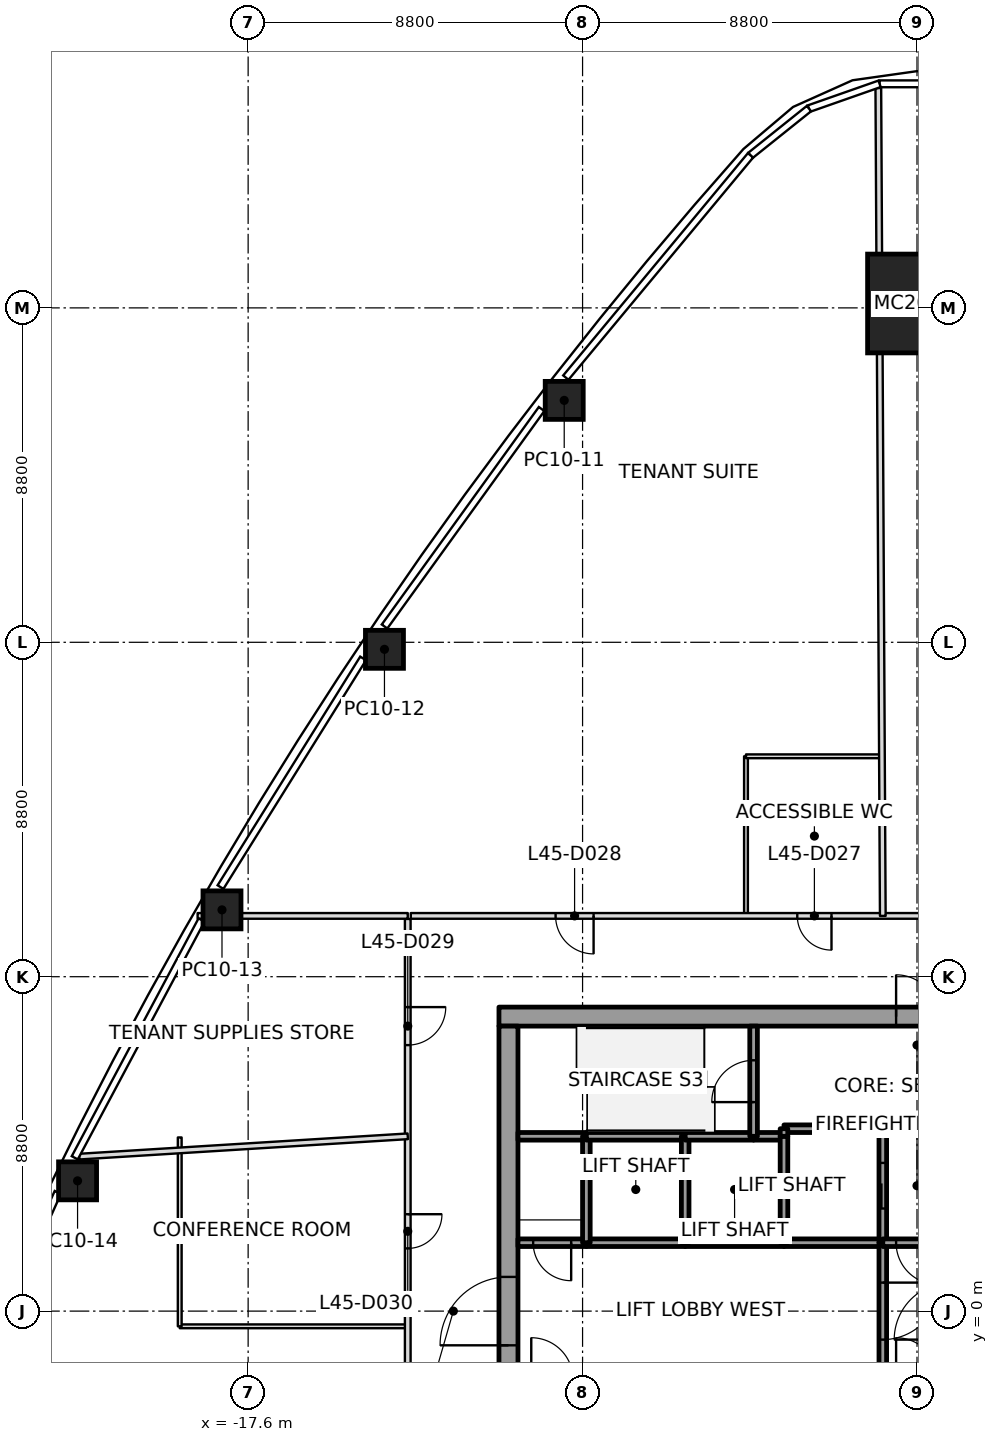
"""IFC4 building model, lengths in metres.
Left out: names, types, materials, properties, quantities, classifications, styles, units other than length and angle.
Written with IfcOpenShell. Run it as: python <this file> out.ifc"""

import sys

from ifc_helpers import new_model, si_unit, direction, frame, frame_2d, origin, origin_2d, place, context, subcontext, project, spatial, rectangle, extrude, element, fill, save


model = new_model("IFC4")
c1 = context("Model", 3, precision=1e-05, world=origin(), true_north=direction((0.0, 1.0)))
c2 = subcontext(c1, "Body", "Model", "MODEL_VIEW")
j1 = project(units=[si_unit("LENGTHUNIT", "METRE"), si_unit("PLANEANGLEUNIT", "RADIAN")], contexts=[c1])
p1 = place(None, origin())
s1 = spatial("IfcSite", under=j1, at=p1, CompositionType="ELEMENT")
p2 = place(p1, origin())
s2 = spatial("IfcBuilding", under=s1, at=p2, CompositionType="ELEMENT")
p3 = place(p2, frame((0.0, 0.0, 201.8)))
s3 = spatial("IfcBuildingStorey", under=s2, at=p3, CompositionType="ELEMENT", Elevation=201.8)
p4 = place(p3, frame((0.0, 26.515, 0.0), z_axis=(0.0, -0.032270781071, 0.999479162709), x_axis=(1.0, 0.0, 0.0)))
e1 = element("IfcColumn", 1, at=p4, inside=s3, PredefinedType="COLUMN", context=c2, shape_type="SweptSolid", body=[
    extrude(rectangle(XDim=2.6, YDim=2.6, at=origin_2d()), origin(), (0.0, 0.0, 1.0), 4.002),
])
p5 = place(p3, frame((-9.283, 23.966, 0.0), z_axis=(0.0002440896, -0.020442503975, 0.999791000385), x_axis=(0.612560827359, 0.79026131933, 0.016008746256)))
e2 = element("IfcColumn", 2, at=p5, inside=s3, PredefinedType="COLUMN", context=c2, shape_type="SweptSolid", body=[
    extrude(rectangle(XDim=1.0, YDim=1.0, at=origin_2d()), origin(), (0.0, 0.0, 1.0), 4.001),
])
p6 = place(p3, frame((-14.013, 17.415, 0.0), z_axis=(0.005309522349, -0.013182262383, 0.999899013366), x_axis=(0.557556155911, 0.830100839547, 0.007983056383)))
e3 = element("IfcColumn", 3, at=p6, inside=s3, PredefinedType="COLUMN", context=c2, shape_type="SweptSolid", body=[
    extrude(rectangle(XDim=1.0, YDim=1.0, at=origin_2d()), origin(), (0.0, 0.0, 1.0), 4.0),
])
p7 = place(p3, frame((-18.288, 10.559, 0.0), z_axis=(0.009948074445, -0.005736926367, 0.999934059571), x_axis=(0.499975258342, 0.8660396879, -5.385525e-06)))
e4 = element("IfcColumn", 4, at=p7, inside=s3, PredefinedType="COLUMN", context=c2, shape_type="SweptSolid", body=[
    extrude(rectangle(XDim=1.0, YDim=1.0, at=origin_2d()), origin(), (0.0, 0.0, 1.0), 4.0),
])
p8 = place(p3, frame((-22.088, 3.428, 0.0), z_axis=(0.014097689605, 0.002074984617, 0.999898469639), x_axis=(0.440091339145, 0.89791676479, -0.008068253744)))
e5 = element("IfcColumn", 5, at=p8, inside=s3, PredefinedType="COLUMN", context=c2, shape_type="SweptSolid", body=[
    extrude(rectangle(XDim=1.0, YDim=1.0, at=origin_2d()), origin(), (0.0, 0.0, 1.0), 4.0),
])
p9 = place(p3, frame((-11.0, 7.75, 0.0), z_axis=(0.0, 0.0, 1.0), x_axis=(1.0, 0.0, 0.0)))
e6 = element("IfcWall", 6, at=p9, inside=s3, PredefinedType="SHEAR", context=c2, shape_type="SweptSolid", body=[
    extrude(rectangle(XDim=22.0, YDim=0.5, at=frame_2d((11.0, 0.0))), origin(), (0.0, 0.0, 1.0), 4.0),
])
p10 = place(p9, frame((10.45, 0.0, 0.0)))
e7 = element("IfcOpeningElement", 7, at=p10, cuts=e6, PredefinedType="OPENING", context=c2, shape_type="SweptSolid", body=[
    extrude(rectangle(XDim=1.1, YDim=2.1, at=frame_2d((0.55, 1.05))), frame((0.0, 0.25, 0.0), z_axis=(0.0, -1.0, 0.0), x_axis=(1.0, 0.0, 0.0)), (0.0, 0.0, 1.0), 0.5),
])
p11 = place(p3, frame((-10.75, -7.5, 0.0), z_axis=(0.0, 0.0, 1.0), x_axis=(0.0, 1.0, 0.0)))
e8 = element("IfcWall", 8, at=p11, inside=s3, PredefinedType="SHEAR", context=c2, shape_type="SweptSolid", body=[
    extrude(rectangle(XDim=15.0, YDim=0.5, at=frame_2d((7.5, 0.0))), origin(), (0.0, 0.0, 1.0), 4.0),
])
p12 = place(p11, frame((6.6, 0.0, 0.0)))
e9 = element("IfcOpeningElement", 9, at=p12, cuts=e8, PredefinedType="OPENING", context=c2, shape_type="SweptSolid", body=[
    extrude(rectangle(XDim=1.8, YDim=2.1, at=frame_2d((0.9, 1.05))), frame((0.0, 0.25, 0.0), z_axis=(0.0, -1.0, 0.0), x_axis=(1.0, 0.0, 0.0)), (0.0, 0.0, 1.0), 0.5),
])
p13 = place(p3, frame((-8.7, 1.8, 0.0), z_axis=(0.0, 0.0, 1.0), x_axis=(-1.0, 0.0, 0.0)))
e10 = element("IfcWall", 10, at=p13, inside=s3, PredefinedType="SOLIDWALL", context=c2, shape_type="SweptSolid", body=[
    extrude(rectangle(XDim=1.8, YDim=0.2, at=frame_2d((0.9, 0.0))), origin(), (0.0, 0.0, 1.0), 3.85),
])
p14 = place(p13, frame((0.4, 0.0, 0.0)))
e11 = element("IfcOpeningElement", 11, at=p14, cuts=e10, PredefinedType="OPENING", context=c2, shape_type="SweptSolid", body=[
    extrude(rectangle(XDim=1.0, YDim=2.1, at=frame_2d((0.5, 1.05))), frame((0.0, 0.1, 0.0), z_axis=(0.0, -1.0, 0.0), x_axis=(1.0, 0.0, 0.0)), (0.0, 0.0, 1.0), 0.2),
])
p15 = place(p3, frame((-8.7, 4.6, 0.0), z_axis=(0.0, 0.0, 1.0), x_axis=(-1.0, 0.0, 0.0)))
e12 = element("IfcWall", 12, at=p15, inside=s3, PredefinedType="SOLIDWALL", context=c2, shape_type="SweptSolid", body=[
    extrude(rectangle(XDim=1.8, YDim=0.2, at=frame_2d((0.9, 0.0))), origin(), (0.0, 0.0, 1.0), 3.85),
])
p16 = place(p3, frame((-6.1, 1.8, 0.0), z_axis=(0.0, 0.0, 1.0), x_axis=(-1.0, 0.0, 0.0)))
e13 = element("IfcWall", 13, at=p16, inside=s3, PredefinedType="SOLIDWALL", context=c2, shape_type="SweptSolid", body=[
    extrude(rectangle(XDim=2.6, YDim=0.2, at=frame_2d((1.3, 0.0))), origin(), (0.0, 0.0, 1.0), 3.85),
])
p17 = place(p3, frame((-8.7, 1.8, 0.0), z_axis=(0.0, 0.0, 1.0), x_axis=(0.0, 1.0, 0.0)))
e14 = element("IfcWall", 14, at=p17, inside=s3, PredefinedType="SOLIDWALL", context=c2, shape_type="SweptSolid", body=[
    extrude(rectangle(XDim=2.8, YDim=0.2, at=frame_2d((1.4, 0.0))), origin(), (0.0, 0.0, 1.0), 3.85),
])
p18 = place(p3, frame((-6.1, 4.6, 0.0), z_axis=(0.0, 0.0, 1.0), x_axis=(-1.0, 0.0, 0.0)))
e15 = element("IfcWall", 15, at=p18, inside=s3, PredefinedType="SOLIDWALL", context=c2, shape_type="SweptSolid", body=[
    extrude(rectangle(XDim=2.6, YDim=0.2, at=frame_2d((1.3, 0.0))), origin(), (0.0, 0.0, 1.0), 3.85),
])
p19 = place(p3, frame((-3.5, 1.8, 0.0), z_axis=(0.0, 0.0, 1.0), x_axis=(-1.0, 0.0, 0.0)))
e16 = element("IfcWall", 16, at=p19, inside=s3, PredefinedType="SOLIDWALL", context=c2, shape_type="SweptSolid", body=[
    extrude(rectangle(XDim=2.6, YDim=0.2, at=frame_2d((1.3, 0.0))), origin(), (0.0, 0.0, 1.0), 3.85),
])
p20 = place(p3, frame((-6.1, 1.8, 0.0), z_axis=(0.0, 0.0, 1.0), x_axis=(0.0, 1.0, 0.0)))
e17 = element("IfcWall", 17, at=p20, inside=s3, PredefinedType="SOLIDWALL", context=c2, shape_type="SweptSolid", body=[
    extrude(rectangle(XDim=2.8, YDim=0.2, at=frame_2d((1.4, 0.0))), origin(), (0.0, 0.0, 1.0), 3.85),
])
p21 = place(p3, frame((-4.3, 4.6, 0.0), z_axis=(0.0, 0.0, 1.0), x_axis=(-1.0, 0.0, 0.0)))
e18 = element("IfcWall", 18, at=p21, inside=s3, PredefinedType="SOLIDWALL", context=c2, shape_type="SweptSolid", body=[
    extrude(rectangle(XDim=1.8, YDim=0.2, at=frame_2d((0.9, 0.0))), origin(), (0.0, 0.0, 1.0), 3.85),
])
p22 = place(p3, frame((-3.5, 4.6, 0.0), z_axis=(0.0, 0.0, 1.0), x_axis=(-1.0, 0.0, 0.0)))
e19 = element("IfcWall", 19, at=p22, inside=s3, PredefinedType="SOLIDWALL", context=c2, shape_type="SweptSolid", body=[
    extrude(rectangle(XDim=0.8, YDim=0.2, at=frame_2d((0.4, 0.0))), origin(), (0.0, 0.0, 1.0), 3.85),
])
p23 = place(p3, frame((-4.3, 4.6, 0.0), z_axis=(0.0, 0.0, 1.0), x_axis=(0.0, 1.0, 0.0)))
e20 = element("IfcWall", 20, at=p23, inside=s3, PredefinedType="SOLIDWALL", context=c2, shape_type="SweptSolid", body=[
    extrude(rectangle(XDim=2.9, YDim=0.2, at=frame_2d((1.45, 0.0))), origin(), (0.0, 0.0, 1.0), 3.85),
])
p24 = place(p23, frame((0.9, 0.0, 0.0)))
e21 = element("IfcOpeningElement", 21, at=p24, cuts=e20, PredefinedType="OPENING", context=c2, shape_type="SweptSolid", body=[
    extrude(rectangle(XDim=1.1, YDim=2.1, at=frame_2d((0.55, 1.05))), frame((0.0, 0.1, 0.0), z_axis=(0.0, -1.0, 0.0), x_axis=(1.0, 0.0, 0.0)), (0.0, 0.0, 1.0), 0.2),
])
p25 = place(p3, frame((-0.9, 1.8, 0.0), z_axis=(0.0, 0.0, 1.0), x_axis=(-1.0, 0.0, 0.0)))
e22 = element("IfcWall", 22, at=p25, inside=s3, PredefinedType="SOLIDWALL", context=c2, shape_type="SweptSolid", body=[
    extrude(rectangle(XDim=2.6, YDim=0.2, at=frame_2d((1.3, 0.0))), origin(), (0.0, 0.0, 1.0), 3.85),
])
p26 = place(p3, frame((-3.5, 4.6, 0.0), z_axis=(0.0, 0.0, 1.0), x_axis=(0.0, -1.0, 0.0)))
e23 = element("IfcWall", 23, at=p26, inside=s3, PredefinedType="SOLIDWALL", context=c2, shape_type="SweptSolid", body=[
    extrude(rectangle(XDim=2.8, YDim=0.2, at=frame_2d((1.4, 0.0))), origin(), (0.0, 0.0, 1.0), 3.85),
])
p27 = place(p3, frame((-0.9, 1.8, 0.0), z_axis=(0.0, 0.0, 1.0), x_axis=(0.0, 1.0, 0.0)))
e24 = element("IfcWall", 24, at=p27, inside=s3, PredefinedType="SOLIDWALL", context=c2, shape_type="SweptSolid", body=[
    extrude(rectangle(XDim=3.0, YDim=0.2, at=frame_2d((1.5, 0.0))), origin(), (0.0, 0.0, 1.0), 3.85),
])
p28 = place(p27, frame((0.9, 0.0, 0.0)))
e25 = element("IfcOpeningElement", 25, at=p28, cuts=e24, PredefinedType="OPENING", context=c2, shape_type="SweptSolid", body=[
    extrude(rectangle(XDim=1.2, YDim=2.1, at=frame_2d((0.6, 1.05))), frame((0.0, 0.1, 0.0), z_axis=(0.0, -1.0, 0.0), x_axis=(1.0, 0.0, 0.0)), (0.0, 0.0, 1.0), 0.2),
])
p29 = place(p3, frame((-0.9, 4.8, 0.0), z_axis=(0.0, 0.0, 1.0), x_axis=(-1.0, 0.0, 0.0)))
e26 = element("IfcWall", 26, at=p29, inside=s3, PredefinedType="SOLIDWALL", context=c2, shape_type="SweptSolid", body=[
    extrude(rectangle(XDim=2.6, YDim=0.2, at=frame_2d((1.3, 0.0))), origin(), (0.0, 0.0, 1.0), 3.85),
])
p30 = place(p3, frame((-3.5, 4.8, 0.0), z_axis=(0.0, 0.0, 1.0), x_axis=(0.0, -1.0, 0.0)))
e27 = element("IfcWall", 27, at=p30, inside=s3, PredefinedType="SOLIDWALL", context=c2, shape_type="SweptSolid", body=[
    extrude(rectangle(XDim=0.2, YDim=0.2, at=frame_2d((0.1, 0.0))), origin(), (0.0, 0.0, 1.0), 3.85),
])
p31 = place(p3, frame((-0.9, 1.8, 0.0), z_axis=(0.0, 0.0, 1.0), x_axis=(0.0, -1.0, 0.0)))
e28 = element("IfcWall", 28, at=p31, inside=s3, PredefinedType="SOLIDWALL", context=c2, shape_type="SweptSolid", body=[
    extrude(rectangle(XDim=3.6, YDim=0.2, at=frame_2d((1.8, 0.0))), origin(), (0.0, 0.0, 1.0), 3.85),
])
p32 = place(p31, frame((1.05, 0.0, 0.0)))
e29 = element("IfcOpeningElement", 29, at=p32, cuts=e28, PredefinedType="OPENING", context=c2, shape_type="SweptSolid", body=[
    extrude(rectangle(XDim=1.5, YDim=2.1, at=frame_2d((0.75, 1.05))), frame((0.0, 0.1, 0.0), z_axis=(0.0, -1.0, 0.0), x_axis=(1.0, 0.0, 0.0)), (0.0, 0.0, 1.0), 0.2),
])
p33 = place(p3, frame((0.9, 1.8, 0.0), z_axis=(0.0, 0.0, 1.0), x_axis=(-1.0, 0.0, 0.0)))
e30 = element("IfcWall", 30, at=p33, inside=s3, PredefinedType="SOLIDWALL", context=c2, shape_type="SweptSolid", body=[
    extrude(rectangle(XDim=1.8, YDim=0.2, at=frame_2d((0.9, 0.0))), origin(), (0.0, 0.0, 1.0), 3.85),
])
p34 = place(p33, frame((0.35, 0.0, 0.0)))
e31 = element("IfcOpeningElement", 31, at=p34, cuts=e30, PredefinedType="OPENING", context=c2, shape_type="SweptSolid", body=[
    extrude(rectangle(XDim=1.1, YDim=2.1, at=frame_2d((0.55, 1.05))), frame((0.0, 0.1, 0.0), z_axis=(0.0, -1.0, 0.0), x_axis=(1.0, 0.0, 0.0)), (0.0, 0.0, 1.0), 0.2),
])
p35 = place(p3, frame((-13.4, 4.6, 0.0), z_axis=(0.0, 0.0, 1.0), x_axis=(-0.998091317923, -0.061755332455, 0.0)))
e32 = element("IfcWall", 32, at=p35, inside=s3, PredefinedType="PARTITIONING", context=c2, shape_type="SweptSolid", body=[
    extrude(rectangle(XDim=8.662, YDim=0.15, at=frame_2d((4.331, 0.0))), origin(), (0.0, 0.0, 1.0), 3.084),
])
p36 = place(p3, frame((-13.4, 10.4, 0.0), z_axis=(0.0, 0.0, 1.0), x_axis=(-1.0, 0.0, 0.0)))
e33 = element("IfcWall", 33, at=p36, inside=s3, PredefinedType="PARTITIONING", context=c2, shape_type="SweptSolid", body=[
    extrude(rectangle(XDim=5.529, YDim=0.15, at=frame_2d((2.765, 0.0))), origin(), (0.0, 0.0, 1.0), 3.3),
])
p37 = place(p3, frame((-0.9, 10.4, 0.0), z_axis=(0.0, 0.0, 1.0), x_axis=(-0.005412837739, 0.999985350487, 0.0)))
e34 = element("IfcWall", 34, at=p37, inside=s3, PredefinedType="PARTITIONING", context=c2, shape_type="SweptSolid", body=[
    extrude(rectangle(XDim=21.785, YDim=0.15, at=frame_2d((10.893, 0.0))), origin(), (0.0, 0.0, 1.0), 3.234),
])
p38 = place(p3, frame((-13.4, 10.32, 0.0), z_axis=(0.0, 0.0, 1.0), x_axis=(0.0, -1.0, 0.0)))
e35 = element("IfcWall", 35, at=p38, inside=s3, PredefinedType="PARTITIONING", context=c2, shape_type="SweptSolid", body=[
    extrude(rectangle(XDim=20.64, YDim=0.15, at=frame_2d((10.32, 0.0))), origin(), (0.0, 0.0, 1.0), 3.097),
])
p39 = place(p38, frame((2.32, 0.0, 0.0)))
e36 = element("IfcOpeningElement", 36, at=p39, cuts=e35, PredefinedType="OPENING", context=c2, shape_type="SweptSolid", body=[
    extrude(rectangle(XDim=1.0, YDim=2.1, at=frame_2d((0.5, 1.05))), frame((0.0, 0.075, 0.0), z_axis=(0.0, -1.0, 0.0), x_axis=(1.0, 0.0, 0.0)), (0.0, 0.0, 1.0), 0.15),
])
p40 = place(p38, frame((7.77, 0.0, 0.0)))
e37 = element("IfcOpeningElement", 37, at=p40, cuts=e35, PredefinedType="OPENING", context=c2, shape_type="SweptSolid", body=[
    extrude(rectangle(XDim=0.9, YDim=2.1, at=frame_2d((0.45, 1.05))), frame((0.0, 0.075, 0.0), z_axis=(0.0, -1.0, 0.0), x_axis=(1.0, 0.0, 0.0)), (0.0, 0.0, 1.0), 0.15),
])
p41 = place(p38, frame((15.28, 0.0, 0.0)))
e38 = element("IfcOpeningElement", 38, at=p41, cuts=e35, PredefinedType="OPENING", context=c2, shape_type="SweptSolid", body=[
    extrude(rectangle(XDim=1.0, YDim=2.1, at=frame_2d((0.5, 1.05))), frame((0.0, 0.075, 0.0), z_axis=(0.0, -1.0, 0.0), x_axis=(1.0, 0.0, 0.0)), (0.0, 0.0, 1.0), 0.15),
])
p42 = place(p3, frame((13.32, 10.4, 0.0), z_axis=(0.0, 0.0, 1.0), x_axis=(-1.0, 0.0, 0.0)))
e39 = element("IfcWall", 39, at=p42, inside=s3, PredefinedType="PARTITIONING", context=c2, shape_type="SweptSolid", body=[
    extrude(rectangle(XDim=26.64, YDim=0.15, at=frame_2d((13.32, 0.0))), origin(), (0.0, 0.0, 1.0), 3.166),
])
p43 = place(p42, frame((1.95, 0.0, 0.0)))
e40 = element("IfcOpeningElement", 40, at=p43, cuts=e39, PredefinedType="OPENING", context=c2, shape_type="SweptSolid", body=[
    extrude(rectangle(XDim=0.9, YDim=2.1, at=frame_2d((0.45, 1.05))), frame((0.0, 0.075, 0.0), z_axis=(0.0, -1.0, 0.0), x_axis=(1.0, 0.0, 0.0)), (0.0, 0.0, 1.0), 0.15),
])
p44 = place(p42, frame((9.11, 0.0, 0.0)))
e41 = element("IfcOpeningElement", 41, at=p44, cuts=e39, PredefinedType="OPENING", context=c2, shape_type="SweptSolid", body=[
    extrude(rectangle(XDim=1.0, YDim=2.1, at=frame_2d((0.5, 1.05))), frame((0.0, 0.075, 0.0), z_axis=(0.0, -1.0, 0.0), x_axis=(1.0, 0.0, 0.0)), (0.0, 0.0, 1.0), 0.15),
])
p45 = place(p42, frame((15.57, 0.0, 0.0)))
e42 = element("IfcOpeningElement", 42, at=p45, cuts=e39, PredefinedType="OPENING", context=c2, shape_type="SweptSolid", body=[
    extrude(rectangle(XDim=0.9, YDim=2.1, at=frame_2d((0.45, 1.05))), frame((0.0, 0.075, 0.0), z_axis=(0.0, -1.0, 0.0), x_axis=(1.0, 0.0, 0.0)), (0.0, 0.0, 1.0), 0.15),
])
p46 = place(p42, frame((21.83, 0.0, 0.0)))
e43 = element("IfcOpeningElement", 43, at=p46, cuts=e39, PredefinedType="OPENING", context=c2, shape_type="SweptSolid", body=[
    extrude(rectangle(XDim=1.0, YDim=2.1, at=frame_2d((0.5, 1.05))), frame((0.0, 0.075, 0.0), z_axis=(0.0, -1.0, 0.0), x_axis=(1.0, 0.0, 0.0)), (0.0, 0.0, 1.0), 0.15),
])
p47 = place(p3, frame((-13.43, -0.4, 0.0), z_axis=(0.0, 0.0, 1.0), x_axis=(-1.0, 0.0, 0.0)))
e44 = element("IfcWall", 44, at=p47, inside=s3, PredefinedType="PARTITIONING", context=c2, shape_type="SweptSolid", body=[
    extrude(rectangle(XDim=5.97, YDim=0.1, at=frame_2d((2.985, 0.0))), origin(), (0.0, 0.0, 1.0), 3.3),
])
p48 = place(p3, frame((-19.4, -0.4, 0.0), z_axis=(0.0, 0.0, 1.0), x_axis=(0.0, 1.0, 0.0)))
e45 = element("IfcWall", 45, at=p48, inside=s3, PredefinedType="PARTITIONING", context=c2, shape_type="SweptSolid", body=[
    extrude(rectangle(XDim=4.97, YDim=0.1, at=frame_2d((2.485, 0.0))), origin(), (0.0, 0.0, 1.0), 3.3),
])
p49 = place(p3, frame((-4.5, 10.43, 0.0), z_axis=(0.0, 0.0, 1.0), x_axis=(0.0, 1.0, 0.0)))
e46 = element("IfcWall", 46, at=p49, inside=s3, PredefinedType="PARTITIONING", context=c2, shape_type="SweptSolid", body=[
    extrude(rectangle(XDim=4.17, YDim=0.1, at=frame_2d((2.085, 0.0))), origin(), (0.0, 0.0, 1.0), 3.3),
])
p50 = place(p3, frame((-4.5, 14.6, 0.0), z_axis=(0.0, 0.0, 1.0), x_axis=(1.0, 0.0, 0.0)))
e47 = element("IfcWall", 47, at=p50, inside=s3, PredefinedType="PARTITIONING", context=c2, shape_type="SweptSolid", body=[
    extrude(rectangle(XDim=3.57, YDim=0.1, at=frame_2d((1.785, 0.0))), origin(), (0.0, 0.0, 1.0), 3.3),
])
p51 = place(p45, origin())
e48 = element("IfcDoor", 48, at=p51, inside=s3, OperationType="SINGLE_SWING_RIGHT", PredefinedType="DOOR", context=c2, shape_type="SweptSolid", body=[
    extrude(rectangle(XDim=0.9, YDim=2.1, at=frame_2d((0.45, 1.05))), frame((0.0, 0.025, 0.0), z_axis=(0.0, -1.0, 0.0), x_axis=(1.0, 0.0, 0.0)), (0.0, 0.0, 1.0), 0.05),
])
fill(e42, e48)
p52 = place(p46, origin())
e49 = element("IfcDoor", 49, at=p52, inside=s3, OperationType="SINGLE_SWING_RIGHT", PredefinedType="DOOR", context=c2, shape_type="SweptSolid", body=[
    extrude(rectangle(XDim=1.0, YDim=2.1, at=frame_2d((0.5, 1.05))), frame((0.0, 0.025, 0.0), z_axis=(0.0, -1.0, 0.0), x_axis=(1.0, 0.0, 0.0)), (0.0, 0.0, 1.0), 0.05),
])
fill(e43, e49)
p53 = place(p39, origin())
e50 = element("IfcDoor", 50, at=p53, inside=s3, OperationType="SINGLE_SWING_RIGHT", PredefinedType="DOOR", context=c2, shape_type="SweptSolid", body=[
    extrude(rectangle(XDim=1.0, YDim=2.1, at=frame_2d((0.5, 1.05))), frame((0.0, 0.025, 0.0), z_axis=(0.0, -1.0, 0.0), x_axis=(1.0, 0.0, 0.0)), (0.0, 0.0, 1.0), 0.05),
])
fill(e36, e50)
p54 = place(p40, origin())
e51 = element("IfcDoor", 51, at=p54, inside=s3, OperationType="SINGLE_SWING_RIGHT", PredefinedType="DOOR", context=c2, shape_type="SweptSolid", body=[
    extrude(rectangle(XDim=0.9, YDim=2.1, at=frame_2d((0.45, 1.05))), frame((0.0, 0.025, 0.0), z_axis=(0.0, -1.0, 0.0), x_axis=(1.0, 0.0, 0.0)), (0.0, 0.0, 1.0), 0.05),
])
fill(e37, e51)
p55 = place(p28, origin())
e52 = element("IfcDoor", 52, at=p55, inside=s3, OperationType="SLIDING_TO_LEFT", PredefinedType="DOOR", context=c2, shape_type="SweptSolid", body=[
    extrude(rectangle(XDim=1.2, YDim=2.1, at=frame_2d((0.6, 1.05))), frame((0.0, 0.025, 0.0), z_axis=(0.0, -1.0, 0.0), x_axis=(1.0, 0.0, 0.0)), (0.0, 0.0, 1.0), 0.05),
])
fill(e25, e52)
p56 = place(p32, origin())
e53 = element("IfcDoor", 53, at=p56, inside=s3, OperationType="DOUBLE_DOOR_SINGLE_SWING", PredefinedType="DOOR", context=c2, shape_type="SweptSolid", body=[
    extrude(rectangle(XDim=1.5, YDim=2.1, at=frame_2d((0.75, 1.05))), frame((0.0, 0.025, 0.0), z_axis=(0.0, -1.0, 0.0), x_axis=(1.0, 0.0, 0.0)), (0.0, 0.0, 1.0), 0.05),
])
fill(e29, e53)
p57 = place(p34, origin())
e54 = element("IfcDoor", 54, at=p57, inside=s3, OperationType="SINGLE_SWING_RIGHT", PredefinedType="DOOR", context=c2, shape_type="SweptSolid", body=[
    extrude(rectangle(XDim=1.1, YDim=2.1, at=frame_2d((0.55, 1.05))), frame((0.0, 0.025, 0.0), z_axis=(0.0, -1.0, 0.0), x_axis=(1.0, 0.0, 0.0)), (0.0, 0.0, 1.0), 0.05),
])
fill(e31, e54)
p58 = place(p14, origin())
e55 = element("IfcDoor", 55, at=p58, inside=s3, OperationType="SINGLE_SWING_RIGHT", PredefinedType="DOOR", context=c2, shape_type="SweptSolid", body=[
    extrude(rectangle(XDim=1.0, YDim=2.1, at=frame_2d((0.5, 1.05))), frame((0.0, 0.025, 0.0), z_axis=(0.0, -1.0, 0.0), x_axis=(1.0, 0.0, 0.0)), (0.0, 0.0, 1.0), 0.05),
])
fill(e11, e55)
p59 = place(p24, origin())
e56 = element("IfcDoor", 56, at=p59, inside=s3, OperationType="SINGLE_SWING_RIGHT", PredefinedType="DOOR", context=c2, shape_type="SweptSolid", body=[
    extrude(rectangle(XDim=1.1, YDim=2.1, at=frame_2d((0.55, 1.05))), frame((0.0, 0.025, 0.0), z_axis=(0.0, -1.0, 0.0), x_axis=(1.0, 0.0, 0.0)), (0.0, 0.0, 1.0), 0.05),
])
fill(e21, e56)
p60 = place(p12, origin())
e57 = element("IfcDoor", 57, at=p60, inside=s3, OperationType="DOUBLE_DOOR_SINGLE_SWING", PredefinedType="DOOR", context=c2, shape_type="SweptSolid", body=[
    extrude(rectangle(XDim=1.8, YDim=2.1, at=frame_2d((0.9, 1.05))), frame((0.0, 0.025, 0.0), z_axis=(0.0, -1.0, 0.0), x_axis=(1.0, 0.0, 0.0)), (0.0, 0.0, 1.0), 0.05),
])
fill(e9, e57)
p61 = place(p10, origin())
e58 = element("IfcDoor", 58, at=p61, inside=s3, OperationType="SINGLE_SWING_LEFT", PredefinedType="DOOR", context=c2, shape_type="SweptSolid", body=[
    extrude(rectangle(XDim=1.1, YDim=2.1, at=frame_2d((0.55, 1.05))), frame((0.0, 0.025, 0.0), z_axis=(0.0, -1.0, 0.0), x_axis=(1.0, 0.0, 0.0)), (0.0, 0.0, 1.0), 0.05),
])
fill(e7, e58)
save(model, sys.argv[1])
